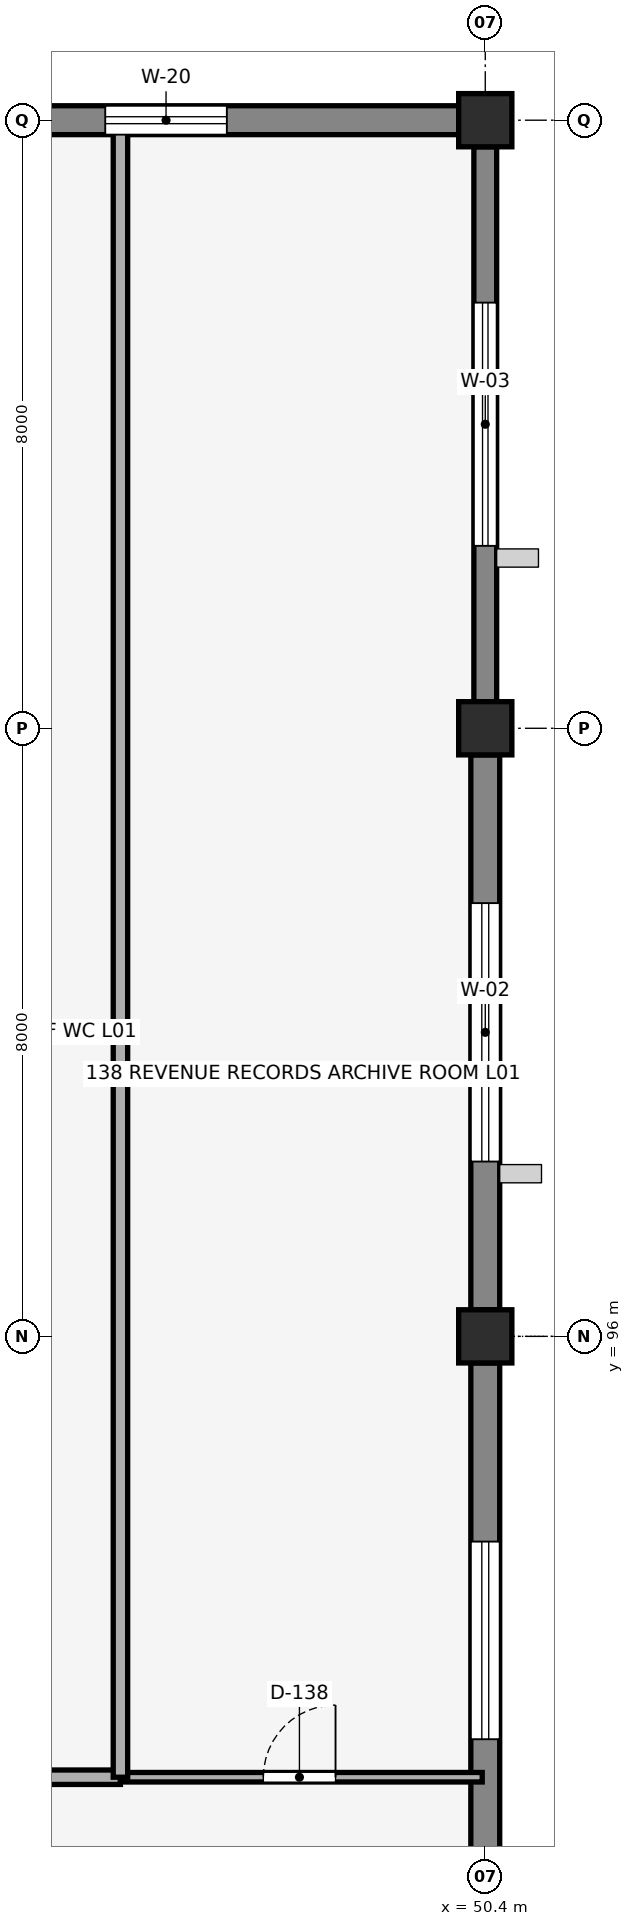
"""IFC4 building model, lengths in metres.
Left out: names, types, materials, properties, quantities, classifications, styles, units other than length and angle.
Written with IfcOpenShell. Run it as: python <this file> out.ifc"""

import sys

from ifc_helpers import new_model, si_unit, direction, frame, frame_2d, origin, origin_2d, place, context, subcontext, project, spatial, rectangle, extrude, element, fill, save


model = new_model("IFC4")
c1 = context("Model", 3, precision=1e-05, world=origin(), true_north=direction((0.0, 1.0)))
c2 = subcontext(c1, "Body", "Model", "MODEL_VIEW")
j1 = project(units=[si_unit("LENGTHUNIT", "METRE"), si_unit("PLANEANGLEUNIT", "RADIAN")], contexts=[c1])
p1 = place(None, origin())
s1 = spatial("IfcSite", under=j1, at=p1, CompositionType="ELEMENT")
p2 = place(p1, origin())
s2 = spatial("IfcBuilding", under=s1, at=p2, CompositionType="ELEMENT")
p3 = place(p2, frame((0.0, 0.0, 5.44)))
s3 = spatial("IfcBuildingStorey", under=s2, at=p3, CompositionType="ELEMENT", Elevation=5.44)
for number, where, z_axis, x_axis in (
    (1, (50.4, 96.0, 0.0), (0.0, 0.0, 1.0), (1.0, 0.0, 0.0)),
    (2, (50.4, 104.0, 0.0), (0.0, 0.0, 1.0), (1.0, 0.0, 0.0)),
    (3, (50.4, 112.0, 0.0), (0.0, 0.0, 1.0), (1.0, 0.0, 0.0)),
):
    element("IfcColumn", number, at=place(p3, frame(where, z_axis=z_axis, x_axis=x_axis)), inside=s3, PredefinedType="COLUMN", context=c2, shape_type="SweptSolid", body=[
        extrude(rectangle(XDim=0.7, YDim=0.7, at=origin_2d()), origin(), (0.0, 0.0, 1.0), 3.8),
    ])
p4 = place(p3, frame((42.35, 112.0, 0.0), z_axis=(0.0, 0.0, 1.0), x_axis=(1.0, 0.0, 0.0)))
e4 = element("IfcWall", 4, at=p4, inside=s3, PredefinedType="SOLIDWALL", context=c2, shape_type="SweptSolid", body=[
    extrude(rectangle(XDim=7.7, YDim=0.38, at=frame_2d((3.85, 0.0))), origin(), (0.0, 0.0, 1.0), 3.45),
])
p5 = place(p4, frame((3.05, 0.0, 0.9), z_axis=(0.0, 0.0, 1.0), x_axis=(1.0, 0.0, 0.0)))
e5 = element("IfcOpeningElement", 5, at=p5, cuts=e4, PredefinedType="OPENING", context=c2, shape_type="SweptSolid", body=[
    extrude(rectangle(XDim=1.6, YDim=1.2, at=frame_2d((0.8, 0.6))), frame((0.0, 0.2, 0.0), z_axis=(0.0, -1.0, 0.0), x_axis=(1.0, 0.0, 0.0)), (0.0, 0.0, 1.0), 0.4),
])
p6 = place(p3, frame((50.4, 88.35, 0.0), z_axis=(0.0, 0.0, 1.0), x_axis=(0.0, 1.0, 0.0)))
e6 = element("IfcWall", 6, at=p6, inside=s3, PredefinedType="SOLIDWALL", context=c2, shape_type="SweptSolid", body=[
    extrude(rectangle(XDim=7.3, YDim=0.38, at=frame_2d((3.65, 0.0))), origin(), (0.0, 0.0, 1.0), 3.442),
])
p7 = place(p6, frame((2.35, 0.0, 2.0), z_axis=(0.0, 0.0, 1.0), x_axis=(1.0, 0.0, 0.0)))
e7 = element("IfcOpeningElement", 7, at=p7, cuts=e6, PredefinedType="OPENING", context=c2, shape_type="SweptSolid", body=[
    extrude(rectangle(XDim=2.6, YDim=0.85, at=frame_2d((1.3, 0.425))), frame((0.0, 0.2, 0.0), z_axis=(0.0, -1.0, 0.0), x_axis=(1.0, 0.0, 0.0)), (0.0, 0.0, 1.0), 0.4),
])
p8 = place(p3, frame((50.4, 96.35, 0.0), z_axis=(0.0, 0.0, 1.0), x_axis=(0.0, 1.0, 0.0)))
e8 = element("IfcWall", 8, at=p8, inside=s3, PredefinedType="SOLIDWALL", context=c2, shape_type="SweptSolid", body=[
    extrude(rectangle(XDim=7.3, YDim=0.38, at=frame_2d((3.65, 0.0))), origin(), (0.0, 0.0, 1.0), 3.442),
])
p9 = place(p8, frame((1.95, 0.0, 0.9), z_axis=(0.0, 0.0, 1.0), x_axis=(1.0, 0.0, 0.0)))
e9 = element("IfcOpeningElement", 9, at=p9, cuts=e8, PredefinedType="OPENING", context=c2, shape_type="SweptSolid", body=[
    extrude(rectangle(XDim=3.4, YDim=1.7, at=frame_2d((1.7, 0.85))), frame((0.0, 0.2, 0.0), z_axis=(0.0, -1.0, 0.0), x_axis=(1.0, 0.0, 0.0)), (0.0, 0.0, 1.0), 0.4),
])
p10 = place(p3, frame((50.4, 104.35, 0.0), z_axis=(0.0, 0.0, 1.0), x_axis=(0.0, 1.0, 0.0)))
e10 = element("IfcWall", 10, at=p10, inside=s3, PredefinedType="SOLIDWALL", context=c2, shape_type="SweptSolid", body=[
    extrude(rectangle(XDim=7.3, YDim=0.3, at=frame_2d((3.65, 0.0))), origin(), (0.0, 0.0, 1.0), 3.442),
])
p11 = place(p10, frame((2.05, 0.0, 0.9), z_axis=(0.0, 0.0, 1.0), x_axis=(1.0, 0.0, 0.0)))
e11 = element("IfcOpeningElement", 11, at=p11, cuts=e10, PredefinedType="OPENING", context=c2, shape_type="SweptSolid", body=[
    extrude(rectangle(XDim=3.2, YDim=1.65, at=frame_2d((1.6, 0.825))), frame((0.0, 0.16, 0.0), z_axis=(0.0, -1.0, 0.0), x_axis=(1.0, 0.0, 0.0)), (0.0, 0.0, 1.0), 0.32),
])
p12 = place(p3, frame((42.0, 90.2, 0.0), z_axis=(0.0, 0.0, 1.0), x_axis=(1.0, 0.0, 0.0)))
e12 = element("IfcWall", 12, at=p12, inside=s3, PredefinedType="PLUMBINGWALL", context=c2, shape_type="SweptSolid", body=[
    extrude(rectangle(XDim=3.6, YDim=0.19, at=frame_2d((1.8, 0.0))), origin(), (0.0, 0.0, 1.0), 3.8),
])
p13 = place(p12, frame((1.3, 0.0, 0.0), z_axis=(0.0, 0.0, 1.0), x_axis=(1.0, 0.0, 0.0)))
e13 = element("IfcOpeningElement", 13, at=p13, cuts=e12, PredefinedType="OPENING", context=c2, shape_type="SweptSolid", body=[
    extrude(rectangle(XDim=0.95, YDim=2.15, at=frame_2d((0.475, 1.075))), frame((0.0, 0.105, 0.0), z_axis=(0.0, -1.0, 0.0), x_axis=(1.0, 0.0, 0.0)), (0.0, 0.0, 1.0), 0.21),
])
p14 = place(p3, frame((45.6, 90.2, 0.0), z_axis=(0.0, 0.0, 1.0), x_axis=(1.0, 0.0, 0.0)))
e14 = element("IfcWall", 14, at=p14, inside=s3, PredefinedType="PARTITIONING", context=c2, shape_type="SweptSolid", body=[
    extrude(rectangle(XDim=4.76, YDim=0.125, at=frame_2d((2.38, 0.0))), origin(), (0.0, 0.0, 1.0), 3.8),
])
p15 = place(p14, frame((1.88, 0.0, 0.0), z_axis=(0.0, 0.0, 1.0), x_axis=(1.0, 0.0, 0.0)))
e15 = element("IfcOpeningElement", 15, at=p15, cuts=e14, PredefinedType="OPENING", context=c2, shape_type="SweptSolid", body=[
    extrude(rectangle(XDim=0.95, YDim=2.15, at=frame_2d((0.475, 1.075))), frame((0.0, 0.073, 0.0), z_axis=(0.0, -1.0, 0.0), x_axis=(1.0, 0.0, 0.0)), (0.0, 0.0, 1.0), 0.145),
])
p16 = place(p3, frame((45.6, 90.2, 0.0), z_axis=(0.0, 0.0, 1.0), x_axis=(0.0, 1.0, 0.0)))
e16 = element("IfcWall", 16, at=p16, inside=s3, PredefinedType="PLUMBINGWALL", context=c2, shape_type="SweptSolid", body=[
    extrude(rectangle(XDim=21.76, YDim=0.19, at=frame_2d((10.88, 0.0))), origin(), (0.0, 0.0, 1.0), 3.8),
])
p17 = place(p5, origin())
e17 = element("IfcWindow", 17, at=p17, inside=s3, PartitioningType="DOUBLE_PANEL_VERTICAL", PredefinedType="WINDOW", context=c2, shape_type="SweptSolid", body=[
    extrude(rectangle(XDim=1.6, YDim=1.2, at=frame_2d((0.8, 0.6))), frame((0.0, 0.03, 0.0), z_axis=(0.0, -1.0, 0.0), x_axis=(1.0, 0.0, 0.0)), (0.0, 0.0, 1.0), 0.06),
])
fill(e5, e17)
p18 = place(p7, origin())
e18 = element("IfcWindow", 18, at=p18, inside=s3, PartitioningType="DOUBLE_PANEL_HORIZONTAL", PredefinedType="WINDOW", context=c2, shape_type="SweptSolid", body=[
    extrude(rectangle(XDim=2.6, YDim=0.85, at=frame_2d((1.3, 0.425))), frame((0.0, 0.03, 0.0), z_axis=(0.0, -1.0, 0.0), x_axis=(1.0, 0.0, 0.0)), (0.0, 0.0, 1.0), 0.06),
])
fill(e7, e18)
p19 = place(p9, origin())
e19 = element("IfcWindow", 19, at=p19, inside=s3, PartitioningType="TRIPLE_PANEL_VERTICAL", PredefinedType="WINDOW", context=c2, shape_type="SweptSolid", body=[
    extrude(rectangle(XDim=3.4, YDim=1.7, at=frame_2d((1.7, 0.85))), frame((0.0, 0.03, 0.0), z_axis=(0.0, -1.0, 0.0), x_axis=(1.0, 0.0, 0.0)), (0.0, 0.0, 1.0), 0.06),
])
fill(e9, e19)
p20 = place(p11, origin())
e20 = element("IfcWindow", 20, at=p20, inside=s3, PartitioningType="TRIPLE_PANEL_VERTICAL", PredefinedType="WINDOW", context=c2, shape_type="SweptSolid", body=[
    extrude(rectangle(XDim=3.2, YDim=1.65, at=frame_2d((1.6, 0.825))), frame((0.0, 0.03, 0.0), z_axis=(0.0, -1.0, 0.0), x_axis=(1.0, 0.0, 0.0)), (0.0, 0.0, 1.0), 0.06),
])
fill(e11, e20)
p21 = place(p15, origin())
e21 = element("IfcDoor", 21, at=p21, inside=s3, OperationType="SINGLE_SWING_RIGHT", PredefinedType="DOOR", context=c2, shape_type="SweptSolid", body=[
    extrude(rectangle(XDim=0.95, YDim=2.15, at=frame_2d((0.475, 1.075))), frame((0.0, 0.025, 0.0), z_axis=(0.0, -1.0, 0.0), x_axis=(1.0, 0.0, 0.0)), (0.0, 0.0, 1.0), 0.05),
])
fill(e15, e21)
save(model, sys.argv[1])
